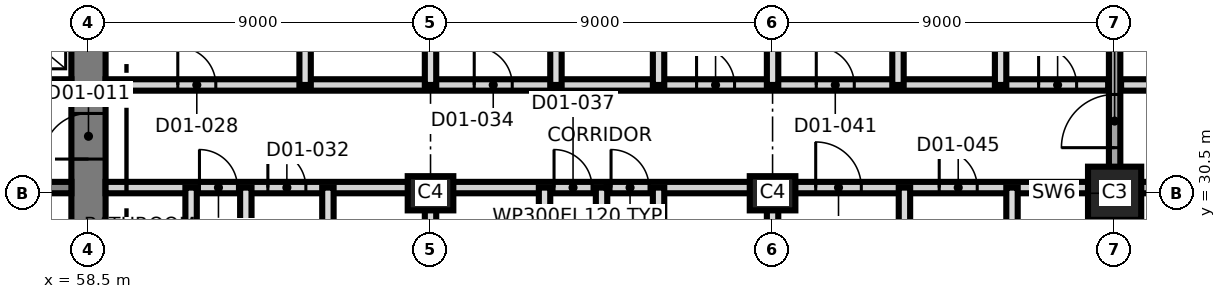
"""IFC4 building model, lengths in metres.
Left out: names, types, materials, properties, quantities, classifications, styles, units other than length and angle.
Written with IfcOpenShell. Run it as: python <this file> out.ifc"""

import sys

from ifc_helpers import new_model, si_unit, direction, frame, frame_2d, origin, origin_2d, place, context, subcontext, project, spatial, rectangle, extrude, element, fill, save


model = new_model("IFC4")
c1 = context("Model", 3, precision=1e-05, world=origin(), true_north=direction((0.0, 1.0)))
c2 = subcontext(c1, "Body", "Model", "MODEL_VIEW")
j1 = project(units=[si_unit("LENGTHUNIT", "METRE"), si_unit("PLANEANGLEUNIT", "RADIAN")], contexts=[c1])
p1 = place(None, origin())
s1 = spatial("IfcSite", under=j1, at=p1, CompositionType="ELEMENT")
p2 = place(p1, origin())
s2 = spatial("IfcBuilding", under=s1, at=p2, CompositionType="ELEMENT")
p3 = place(p2, frame((0.0, 0.0, 33.5)))
s3 = spatial("IfcBuildingStorey", under=s2, at=p3, CompositionType="ELEMENT", Elevation=33.5)
p4 = place(p3, frame((58.5, 21.05, 0.0), z_axis=(0.0, 0.0, 1.0), x_axis=(0.0, 1.0, 0.0)))
e1 = element("IfcWall", 1, at=p4, inside=s3, PredefinedType="SHEAR", context=c2, shape_type="SweptSolid", body=[
    extrude(rectangle(XDim=18.9, YDim=0.9, at=frame_2d((9.45, 0.0))), origin(), (0.0, 0.0, 1.0), 3.7),
])
p5 = place(p4, frame((10.35, 0.0, 0.0)))
e2 = element("IfcOpeningElement", 2, at=p5, cuts=e1, PredefinedType="OPENING", context=c2, shape_type="SweptSolid", body=[
    extrude(rectangle(XDim=1.2, YDim=2.1, at=frame_2d((0.6, 1.05))), frame((0.0, 0.46, 0.0), z_axis=(0.0, -1.0, 0.0), x_axis=(1.0, 0.0, 0.0)), (0.0, 0.0, 1.0), 0.92),
])
p6 = place(p3, frame((31.95, 30.65, 0.0), z_axis=(0.0, 0.0, 1.0), x_axis=(1.0, 0.0, 0.0)))
e3 = element("IfcWall", 3, at=p6, inside=s3, PredefinedType="SHEAR", context=c2, shape_type="SweptSolid", body=[
    extrude(rectangle(XDim=26.1, YDim=0.3, at=frame_2d((13.05, 0.0))), origin(), (0.0, 0.0, 1.0), 3.7),
])
p7 = place(p6, frame((24.55, 0.0, 0.0)))
e4 = element("IfcOpeningElement", 4, at=p7, cuts=e3, PredefinedType="OPENING", context=c2, shape_type="SweptSolid", body=[
    extrude(rectangle(XDim=1.0, YDim=2.1, at=frame_2d((0.5, 1.05))), frame((0.0, 0.16, 0.0), z_axis=(0.0, -1.0, 0.0), x_axis=(1.0, 0.0, 0.0)), (0.0, 0.0, 1.0), 0.32),
])
p8 = place(p6, frame((11.35, 0.0, 0.0)))
e5 = element("IfcOpeningElement", 5, at=p8, cuts=e3, PredefinedType="OPENING", context=c2, shape_type="SweptSolid", body=[
    extrude(rectangle(XDim=1.0, YDim=2.1, at=frame_2d((0.5, 1.05))), frame((0.0, 0.16, 0.0), z_axis=(0.0, -1.0, 0.0), x_axis=(1.0, 0.0, 0.0)), (0.0, 0.0, 1.0), 0.32),
])
p9 = place(p3, frame((31.95, 33.35, 0.0), z_axis=(0.0, 0.0, 1.0), x_axis=(1.0, 0.0, 0.0)))
e6 = element("IfcWall", 6, at=p9, inside=s3, PredefinedType="SHEAR", context=c2, shape_type="SweptSolid", body=[
    extrude(rectangle(XDim=26.1, YDim=0.3, at=frame_2d((13.05, 0.0))), origin(), (0.0, 0.0, 1.0), 3.7),
])
p10 = place(p9, frame((13.7, 0.0, 0.0)))
e7 = element("IfcOpeningElement", 7, at=p10, cuts=e6, PredefinedType="OPENING", context=c2, shape_type="SweptSolid", body=[
    extrude(rectangle(XDim=1.4, YDim=2.1, at=frame_2d((0.7, 1.05))), frame((0.0, 0.16, 0.0), z_axis=(0.0, -1.0, 0.0), x_axis=(1.0, 0.0, 0.0)), (0.0, 0.0, 1.0), 0.32),
])
p11 = place(p9, frame((5.175, 0.0, 0.0)))
e8 = element("IfcOpeningElement", 8, at=p11, cuts=e6, PredefinedType="OPENING", context=c2, shape_type="SweptSolid", body=[
    extrude(rectangle(XDim=1.2, YDim=2.1, at=frame_2d((0.6, 1.05))), frame((0.0, 0.16, 0.0), z_axis=(0.0, -1.0, 0.0), x_axis=(1.0, 0.0, 0.0)), (0.0, 0.0, 1.0), 0.32),
])
p12 = place(p9, frame((19.725, 0.0, 0.0)))
e9 = element("IfcOpeningElement", 9, at=p12, cuts=e6, PredefinedType="OPENING", context=c2, shape_type="SweptSolid", body=[
    extrude(rectangle(XDim=1.2, YDim=2.1, at=frame_2d((0.6, 1.05))), frame((0.0, 0.16, 0.0), z_axis=(0.0, -1.0, 0.0), x_axis=(1.0, 0.0, 0.0)), (0.0, 0.0, 1.0), 0.32),
])
for number, where, z_axis, x_axis in (
    (10, (67.5, 30.5, 0.0), (0.0, 0.0, 1.0), (1.0, 0.0, 0.0)),
    (11, (76.5, 30.5, 0.0), (0.0, 0.0, 1.0), (1.0, 0.0, 0.0)),
):
    element("IfcColumn", number, at=place(p3, frame(where, z_axis=z_axis, x_axis=x_axis)), inside=s3, PredefinedType="COLUMN", context=c2, shape_type="SweptSolid", body=[
        extrude(rectangle(XDim=1.2, YDim=0.9, at=origin_2d()), origin(), (0.0, 0.0, 1.0), 3.7),
    ])
p13 = place(p3, frame((85.5, 30.5, 0.0), z_axis=(0.0, 0.0, 1.0), x_axis=(1.0, 0.0, 0.0)))
e12 = element("IfcColumn", 12, at=p13, inside=s3, PredefinedType="COLUMN", context=c2, shape_type="SweptSolid", body=[
    extrude(rectangle(XDim=1.4, YDim=1.4, at=origin_2d()), origin(), (0.0, 0.0, 1.0), 3.7),
])
p14 = place(p3, frame((85.5, 21.425, 0.0), z_axis=(0.0, 0.0, 1.0), x_axis=(0.0, 1.0, 0.0)))
e13 = element("IfcWall", 13, at=p14, inside=s3, PredefinedType="SHEAR", context=c2, shape_type="SweptSolid", body=[
    extrude(rectangle(XDim=18.15, YDim=0.3, at=frame_2d((9.075, 0.0))), origin(), (0.0, 0.0, 1.0), 3.7),
])
p15 = place(p14, frame((10.275, 0.0, 0.0)))
e14 = element("IfcOpeningElement", 14, at=p15, cuts=e13, PredefinedType="OPENING", context=c2, shape_type="SweptSolid", body=[
    extrude(rectangle(XDim=1.4, YDim=2.1, at=frame_2d((0.7, 1.05))), frame((0.0, 0.16, 0.0), z_axis=(0.0, -1.0, 0.0), x_axis=(1.0, 0.0, 0.0)), (0.0, 0.0, 1.0), 0.32),
])
p16 = place(p3, frame((58.95, 30.65, 0.0), z_axis=(0.0, 0.0, 1.0), x_axis=(1.0, 0.0, 0.0)))
e15 = element("IfcWall", 15, at=p16, inside=s3, PredefinedType="PARTITIONING", context=c2, shape_type="SweptSolid", body=[
    extrude(rectangle(XDim=26.38, YDim=0.3, at=frame_2d((13.19, 0.0))), origin(), (0.0, 0.0, 1.0), 3.4),
])
p17 = place(p16, frame((2.47, 0.0, 0.0)))
e16 = element("IfcOpeningElement", 16, at=p17, cuts=e15, PredefinedType="OPENING", context=c2, shape_type="SweptSolid", body=[
    extrude(rectangle(XDim=1.0, YDim=2.1, at=frame_2d((0.5, 1.05))), frame((0.0, 0.16, 0.0), z_axis=(0.0, -1.0, 0.0), x_axis=(1.0, 0.0, 0.0)), (0.0, 0.0, 1.0), 0.32),
])
p18 = place(p16, frame((4.27, 0.0, 0.0)))
e17 = element("IfcOpeningElement", 17, at=p18, cuts=e15, PredefinedType="OPENING", context=c2, shape_type="SweptSolid", body=[
    extrude(rectangle(XDim=1.0, YDim=2.1, at=frame_2d((0.5, 1.05))), frame((0.0, 0.16, 0.0), z_axis=(0.0, -1.0, 0.0), x_axis=(1.0, 0.0, 0.0)), (0.0, 0.0, 1.0), 0.32),
])
p19 = place(p16, frame((11.8, 0.0, 0.0)))
e18 = element("IfcOpeningElement", 18, at=p19, cuts=e15, PredefinedType="OPENING", context=c2, shape_type="SweptSolid", body=[
    extrude(rectangle(XDim=1.0, YDim=2.4, at=frame_2d((0.5, 1.2))), frame((0.0, 0.16, 0.0), z_axis=(0.0, -1.0, 0.0), x_axis=(1.0, 0.0, 0.0)), (0.0, 0.0, 1.0), 0.32),
])
p20 = place(p16, frame((13.3, 0.0, 0.0)))
e19 = element("IfcOpeningElement", 19, at=p20, cuts=e15, PredefinedType="OPENING", context=c2, shape_type="SweptSolid", body=[
    extrude(rectangle(XDim=1.0, YDim=2.4, at=frame_2d((0.5, 1.2))), frame((0.0, 0.16, 0.0), z_axis=(0.0, -1.0, 0.0), x_axis=(1.0, 0.0, 0.0)), (0.0, 0.0, 1.0), 0.32),
])
p21 = place(p16, frame((18.685, 0.0, 0.0)))
e20 = element("IfcOpeningElement", 20, at=p21, cuts=e15, PredefinedType="OPENING", context=c2, shape_type="SweptSolid", body=[
    extrude(rectangle(XDim=1.2, YDim=2.1, at=frame_2d((0.6, 1.05))), frame((0.0, 0.16, 0.0), z_axis=(0.0, -1.0, 0.0), x_axis=(1.0, 0.0, 0.0)), (0.0, 0.0, 1.0), 0.32),
])
p22 = place(p16, frame((21.935, 0.0, 0.0)))
e21 = element("IfcOpeningElement", 21, at=p22, cuts=e15, PredefinedType="OPENING", context=c2, shape_type="SweptSolid", body=[
    extrude(rectangle(XDim=1.0, YDim=2.1, at=frame_2d((0.5, 1.05))), frame((0.0, 0.16, 0.0), z_axis=(0.0, -1.0, 0.0), x_axis=(1.0, 0.0, 0.0)), (0.0, 0.0, 1.0), 0.32),
])
p23 = place(p3, frame((85.67, 30.65, 0.0), z_axis=(0.0, 0.0, 1.0), x_axis=(1.0, 0.0, 0.0)))
e22 = element("IfcWall", 22, at=p23, inside=s3, PredefinedType="SHEAR", context=c2, shape_type="SweptSolid", body=[
    extrude(rectangle(XDim=8.905, YDim=0.3, at=frame_2d((4.453, 0.0))), origin(), (0.0, 0.0, 1.0), 3.4),
])
p24 = place(p23, frame((2.08, 0.0, 0.0)))
e23 = element("IfcOpeningElement", 23, at=p24, cuts=e22, PredefinedType="OPENING", context=c2, shape_type="SweptSolid", body=[
    extrude(rectangle(XDim=1.2, YDim=2.1, at=frame_2d((0.6, 1.05))), frame((0.0, 0.16, 0.0), z_axis=(0.0, -1.0, 0.0), x_axis=(1.0, 0.0, 0.0)), (0.0, 0.0, 1.0), 0.32),
])
p25 = place(p23, frame((5.63, 0.0, 0.0)))
e24 = element("IfcOpeningElement", 24, at=p25, cuts=e22, PredefinedType="OPENING", context=c2, shape_type="SweptSolid", body=[
    extrude(rectangle(XDim=1.0, YDim=2.1, at=frame_2d((0.5, 1.05))), frame((0.0, 0.16, 0.0), z_axis=(0.0, -1.0, 0.0), x_axis=(1.0, 0.0, 0.0)), (0.0, 0.0, 1.0), 0.32),
])
p26 = place(p3, frame((58.95, 33.35, 0.0), z_axis=(0.0, 0.0, 1.0), x_axis=(1.0, 0.0, 0.0)))
e25 = element("IfcWall", 25, at=p26, inside=s3, PredefinedType="PARTITIONING", context=c2, shape_type="SweptSolid", body=[
    extrude(rectangle(XDim=26.38, YDim=0.3, at=frame_2d((13.19, 0.0))), origin(), (0.0, 0.0, 1.0), 3.4),
])
p27 = place(p26, frame((1.9, 0.0, 0.0)))
e26 = element("IfcOpeningElement", 26, at=p27, cuts=e25, PredefinedType="OPENING", context=c2, shape_type="SweptSolid", body=[
    extrude(rectangle(XDim=1.0, YDim=2.4, at=frame_2d((0.5, 1.2))), frame((0.0, 0.16, 0.0), z_axis=(0.0, -1.0, 0.0), x_axis=(1.0, 0.0, 0.0)), (0.0, 0.0, 1.0), 0.32),
])
p28 = place(p26, frame((9.7, 0.0, 0.0)))
e27 = element("IfcOpeningElement", 27, at=p28, cuts=e25, PredefinedType="OPENING", context=c2, shape_type="SweptSolid", body=[
    extrude(rectangle(XDim=1.0, YDim=2.1, at=frame_2d((0.5, 1.05))), frame((0.0, 0.16, 0.0), z_axis=(0.0, -1.0, 0.0), x_axis=(1.0, 0.0, 0.0)), (0.0, 0.0, 1.0), 0.32),
])
p29 = place(p26, frame((15.55, 0.0, 0.0)))
e28 = element("IfcOpeningElement", 28, at=p29, cuts=e25, PredefinedType="OPENING", context=c2, shape_type="SweptSolid", body=[
    extrude(rectangle(XDim=1.0, YDim=2.1, at=frame_2d((0.5, 1.05))), frame((0.0, 0.16, 0.0), z_axis=(0.0, -1.0, 0.0), x_axis=(1.0, 0.0, 0.0)), (0.0, 0.0, 1.0), 0.32),
])
p30 = place(p26, frame((18.7, 0.0, 0.0)))
e29 = element("IfcOpeningElement", 29, at=p30, cuts=e25, PredefinedType="OPENING", context=c2, shape_type="SweptSolid", body=[
    extrude(rectangle(XDim=1.0, YDim=2.1, at=frame_2d((0.5, 1.05))), frame((0.0, 0.16, 0.0), z_axis=(0.0, -1.0, 0.0), x_axis=(1.0, 0.0, 0.0)), (0.0, 0.0, 1.0), 0.32),
])
p31 = place(p26, frame((24.55, 0.0, 0.0)))
e30 = element("IfcOpeningElement", 30, at=p31, cuts=e25, PredefinedType="OPENING", context=c2, shape_type="SweptSolid", body=[
    extrude(rectangle(XDim=1.0, YDim=2.1, at=frame_2d((0.5, 1.05))), frame((0.0, 0.16, 0.0), z_axis=(0.0, -1.0, 0.0), x_axis=(1.0, 0.0, 0.0)), (0.0, 0.0, 1.0), 0.32),
])
p32 = place(p3, frame((85.67, 33.35, 0.0), z_axis=(0.0, 0.0, 1.0), x_axis=(1.0, 0.0, 0.0)))
e31 = element("IfcWall", 31, at=p32, inside=s3, PredefinedType="PARTITIONING", context=c2, shape_type="SweptSolid", body=[
    extrude(rectangle(XDim=8.79, YDim=0.3, at=frame_2d((4.395, 0.0))), origin(), (0.0, 0.0, 1.0), 3.4),
])
p33 = place(p32, frame((1.83, 0.0, 0.0)))
e32 = element("IfcOpeningElement", 32, at=p33, cuts=e31, PredefinedType="OPENING", context=c2, shape_type="SweptSolid", body=[
    extrude(rectangle(XDim=1.0, YDim=2.1, at=frame_2d((0.5, 1.05))), frame((0.0, 0.16, 0.0), z_axis=(0.0, -1.0, 0.0), x_axis=(1.0, 0.0, 0.0)), (0.0, 0.0, 1.0), 0.32),
])
p34 = place(p32, frame((5.63, 0.0, 0.0)))
e33 = element("IfcOpeningElement", 33, at=p34, cuts=e31, PredefinedType="OPENING", context=c2, shape_type="SweptSolid", body=[
    extrude(rectangle(XDim=1.0, YDim=2.1, at=frame_2d((0.5, 1.05))), frame((0.0, 0.16, 0.0), z_axis=(0.0, -1.0, 0.0), x_axis=(1.0, 0.0, 0.0)), (0.0, 0.0, 1.0), 0.32),
])
p35 = place(p3, frame((61.2, 27.45, 0.0), z_axis=(0.0, 0.0, 1.0), x_axis=(0.0, 1.0, 0.0)))
e34 = element("IfcWall", 34, at=p35, inside=s3, PredefinedType="PARTITIONING", context=c2, shape_type="SweptSolid", body=[
    extrude(rectangle(XDim=3.2, YDim=0.3, at=frame_2d((1.6, 0.0))), origin(), (0.0, 0.0, 1.0), 3.4),
])
p36 = place(p3, frame((62.64, 21.425, 0.0), z_axis=(0.0, 0.0, 1.0), x_axis=(0.0, 1.0, 0.0)))
e35 = element("IfcWall", 35, at=p36, inside=s3, PredefinedType="PARTITIONING", context=c2, shape_type="SweptSolid", body=[
    extrude(rectangle(XDim=9.225, YDim=0.3, at=frame_2d((4.612, 0.0))), origin(), (0.0, 0.0, 1.0), 3.4),
])
p37 = place(p3, frame((64.2, 33.35, 0.0), z_axis=(0.0, 0.0, 1.0), x_axis=(0.0, 1.0, 0.0)))
e36 = element("IfcWall", 36, at=p37, inside=s3, PredefinedType="PARTITIONING", context=c2, shape_type="SweptSolid", body=[
    extrude(rectangle(XDim=3.5, YDim=0.3, at=frame_2d((1.75, 0.0))), origin(), (0.0, 0.0, 1.0), 3.4),
])
p38 = place(p3, frame((64.8, 27.45, 0.0), z_axis=(0.0, 0.0, 1.0), x_axis=(0.0, 1.0, 0.0)))
e37 = element("IfcWall", 37, at=p38, inside=s3, PredefinedType="PARTITIONING", context=c2, shape_type="SweptSolid", body=[
    extrude(rectangle(XDim=3.2, YDim=0.3, at=frame_2d((1.6, 0.0))), origin(), (0.0, 0.0, 1.0), 3.4),
])
p39 = place(p3, frame((67.5, 21.425, 0.0), z_axis=(0.0, 0.0, 1.0), x_axis=(0.0, 1.0, 0.0)))
e38 = element("IfcWall", 38, at=p39, inside=s3, PredefinedType="PARTITIONING", context=c2, shape_type="SweptSolid", body=[
    extrude(rectangle(XDim=9.225, YDim=0.3, at=frame_2d((4.612, 0.0))), origin(), (0.0, 0.0, 1.0), 3.4),
])
p40 = place(p3, frame((67.5, 33.35, 0.0), z_axis=(0.0, 0.0, 1.0), x_axis=(0.0, 1.0, 0.0)))
e39 = element("IfcWall", 39, at=p40, inside=s3, PredefinedType="PARTITIONING", context=c2, shape_type="SweptSolid", body=[
    extrude(rectangle(XDim=6.225, YDim=0.3, at=frame_2d((3.112, 0.0))), origin(), (0.0, 0.0, 1.0), 3.4),
])
p41 = place(p3, frame((70.5, 27.35, 0.0), z_axis=(0.0, 0.0, 1.0), x_axis=(0.0, 1.0, 0.0)))
e40 = element("IfcWall", 40, at=p41, inside=s3, PredefinedType="PARTITIONING", context=c2, shape_type="SweptSolid", body=[
    extrude(rectangle(XDim=3.3, YDim=0.3, at=frame_2d((1.65, 0.0))), origin(), (0.0, 0.0, 1.0), 3.4),
])
p42 = place(p3, frame((70.8, 33.35, 0.0), z_axis=(0.0, 0.0, 1.0), x_axis=(0.0, 1.0, 0.0)))
e41 = element("IfcWall", 41, at=p42, inside=s3, PredefinedType="PARTITIONING", context=c2, shape_type="SweptSolid", body=[
    extrude(rectangle(XDim=3.2, YDim=0.3, at=frame_2d((1.6, 0.0))), origin(), (0.0, 0.0, 1.0), 3.4),
])
p43 = place(p3, frame((72.0, 21.425, 0.0), z_axis=(0.0, 0.0, 1.0), x_axis=(0.0, 1.0, 0.0)))
e42 = element("IfcWall", 42, at=p43, inside=s3, PredefinedType="PARTITIONING", context=c2, shape_type="SweptSolid", body=[
    extrude(rectangle(XDim=9.225, YDim=0.3, at=frame_2d((4.612, 0.0))), origin(), (0.0, 0.0, 1.0), 3.4),
])
p44 = place(p3, frame((73.5, 27.35, 0.0), z_axis=(0.0, 0.0, 1.0), x_axis=(0.0, 1.0, 0.0)))
e43 = element("IfcWall", 43, at=p44, inside=s3, PredefinedType="PARTITIONING", context=c2, shape_type="SweptSolid", body=[
    extrude(rectangle(XDim=3.3, YDim=0.3, at=frame_2d((1.65, 0.0))), origin(), (0.0, 0.0, 1.0), 3.4),
])
p45 = place(p3, frame((73.5, 33.35, 0.0), z_axis=(0.0, 0.0, 1.0), x_axis=(0.0, 1.0, 0.0)))
e44 = element("IfcWall", 44, at=p45, inside=s3, PredefinedType="PARTITIONING", context=c2, shape_type="SweptSolid", body=[
    extrude(rectangle(XDim=6.405, YDim=0.3, at=frame_2d((3.202, 0.0))), origin(), (0.0, 0.0, 1.0), 3.4),
])
p46 = place(p3, frame((76.5, 21.425, 0.0), z_axis=(0.0, 0.0, 1.0), x_axis=(0.0, 1.0, 0.0)))
e45 = element("IfcWall", 45, at=p46, inside=s3, PredefinedType="PARTITIONING", context=c2, shape_type="SweptSolid", body=[
    extrude(rectangle(XDim=9.225, YDim=0.3, at=frame_2d((4.612, 0.0))), origin(), (0.0, 0.0, 1.0), 3.4),
])
p47 = place(p3, frame((76.5, 33.35, 0.0), z_axis=(0.0, 0.0, 1.0), x_axis=(0.0, 1.0, 0.0)))
e46 = element("IfcWall", 46, at=p47, inside=s3, PredefinedType="PARTITIONING", context=c2, shape_type="SweptSolid", body=[
    extrude(rectangle(XDim=6.225, YDim=0.3, at=frame_2d((3.112, 0.0))), origin(), (0.0, 0.0, 1.0), 3.4),
])
p48 = place(p3, frame((79.8, 33.35, 0.0), z_axis=(0.0, 0.0, 1.0), x_axis=(0.0, 1.0, 0.0)))
e47 = element("IfcWall", 47, at=p48, inside=s3, PredefinedType="PARTITIONING", context=c2, shape_type="SweptSolid", body=[
    extrude(rectangle(XDim=3.2, YDim=0.3, at=frame_2d((1.6, 0.0))), origin(), (0.0, 0.0, 1.0), 3.4),
])
p49 = place(p3, frame((79.97, 21.425, 0.0), z_axis=(0.0, 0.0, 1.0), x_axis=(0.0, 1.0, 0.0)))
e48 = element("IfcWall", 48, at=p49, inside=s3, PredefinedType="PARTITIONING", context=c2, shape_type="SweptSolid", body=[
    extrude(rectangle(XDim=9.225, YDim=0.3, at=frame_2d((4.612, 0.0))), origin(), (0.0, 0.0, 1.0), 3.4),
])
p50 = place(p3, frame((82.5, 33.35, 0.0), z_axis=(0.0, 0.0, 1.0), x_axis=(0.0, 1.0, 0.0)))
e49 = element("IfcWall", 49, at=p50, inside=s3, PredefinedType="PARTITIONING", context=c2, shape_type="SweptSolid", body=[
    extrude(rectangle(XDim=6.405, YDim=0.3, at=frame_2d((3.202, 0.0))), origin(), (0.0, 0.0, 1.0), 3.4),
])
p51 = place(p3, frame((82.8, 27.45, 0.0), z_axis=(0.0, 0.0, 1.0), x_axis=(0.0, 1.0, 0.0)))
e50 = element("IfcWall", 50, at=p51, inside=s3, PredefinedType="PARTITIONING", context=c2, shape_type="SweptSolid", body=[
    extrude(rectangle(XDim=3.2, YDim=0.3, at=frame_2d((1.6, 0.0))), origin(), (0.0, 0.0, 1.0), 3.4),
])
p52 = place(p5, origin())
e51 = element("IfcDoor", 51, at=p52, inside=s3, OperationType="SINGLE_SWING_LEFT", PredefinedType="DOOR", context=c2, shape_type="SweptSolid", body=[
    extrude(rectangle(XDim=1.2, YDim=2.1, at=frame_2d((0.6, 1.05))), frame((0.0, 0.025, 0.0), z_axis=(0.0, -1.0, 0.0), x_axis=(1.0, 0.0, 0.0)), (0.0, 0.0, 1.0), 0.05),
])
fill(e2, e51)
p53 = place(p27, origin())
e52 = element("IfcDoor", 52, at=p53, inside=s3, OperationType="SINGLE_SWING_LEFT", PredefinedType="DOOR", context=c2, shape_type="SweptSolid", body=[
    extrude(rectangle(XDim=1.0, YDim=2.4, at=frame_2d((0.5, 1.2))), frame((0.0, 0.025, 0.0), z_axis=(0.0, -1.0, 0.0), x_axis=(1.0, 0.0, 0.0)), (0.0, 0.0, 1.0), 0.05),
])
fill(e26, e52)
p54 = place(p17, origin())
e53 = element("IfcDoor", 53, at=p54, inside=s3, OperationType="SINGLE_SWING_RIGHT", PredefinedType="DOOR", context=c2, shape_type="SweptSolid", body=[
    extrude(rectangle(XDim=1.0, YDim=2.1, at=frame_2d((0.5, 1.05))), frame((0.0, 0.025, 0.0), z_axis=(0.0, -1.0, 0.0), x_axis=(1.0, 0.0, 0.0)), (0.0, 0.0, 1.0), 0.05),
])
fill(e16, e53)
p55 = place(p18, origin())
e54 = element("IfcDoor", 54, at=p55, inside=s3, OperationType="SINGLE_SWING_LEFT", PredefinedType="DOOR", context=c2, shape_type="SweptSolid", body=[
    extrude(rectangle(XDim=1.0, YDim=2.1, at=frame_2d((0.5, 1.05))), frame((0.0, 0.025, 0.0), z_axis=(0.0, -1.0, 0.0), x_axis=(1.0, 0.0, 0.0)), (0.0, 0.0, 1.0), 0.05),
])
fill(e17, e54)
p56 = place(p28, origin())
e55 = element("IfcDoor", 55, at=p56, inside=s3, OperationType="SINGLE_SWING_LEFT", PredefinedType="DOOR", context=c2, shape_type="SweptSolid", body=[
    extrude(rectangle(XDim=1.0, YDim=2.1, at=frame_2d((0.5, 1.05))), frame((0.0, 0.025, 0.0), z_axis=(0.0, -1.0, 0.0), x_axis=(1.0, 0.0, 0.0)), (0.0, 0.0, 1.0), 0.05),
])
fill(e27, e55)
p57 = place(p29, origin())
e56 = element("IfcDoor", 56, at=p57, inside=s3, OperationType="SINGLE_SWING_RIGHT", PredefinedType="DOOR", context=c2, shape_type="SweptSolid", body=[
    extrude(rectangle(XDim=1.0, YDim=2.1, at=frame_2d((0.5, 1.05))), frame((0.0, 0.025, 0.0), z_axis=(0.0, -1.0, 0.0), x_axis=(1.0, 0.0, 0.0)), (0.0, 0.0, 1.0), 0.05),
])
fill(e28, e56)
p58 = place(p19, origin())
e57 = element("IfcDoor", 57, at=p58, inside=s3, OperationType="SINGLE_SWING_LEFT", PredefinedType="DOOR", context=c2, shape_type="SweptSolid", body=[
    extrude(rectangle(XDim=1.0, YDim=2.4, at=frame_2d((0.5, 1.2))), frame((0.0, 0.025, 0.0), z_axis=(0.0, -1.0, 0.0), x_axis=(1.0, 0.0, 0.0)), (0.0, 0.0, 1.0), 0.05),
])
fill(e18, e57)
p59 = place(p20, origin())
e58 = element("IfcDoor", 58, at=p59, inside=s3, OperationType="SINGLE_SWING_RIGHT", PredefinedType="DOOR", context=c2, shape_type="SweptSolid", body=[
    extrude(rectangle(XDim=1.0, YDim=2.4, at=frame_2d((0.5, 1.2))), frame((0.0, 0.025, 0.0), z_axis=(0.0, -1.0, 0.0), x_axis=(1.0, 0.0, 0.0)), (0.0, 0.0, 1.0), 0.05),
])
fill(e19, e58)
p60 = place(p30, origin())
e59 = element("IfcDoor", 59, at=p60, inside=s3, OperationType="SINGLE_SWING_LEFT", PredefinedType="DOOR", context=c2, shape_type="SweptSolid", body=[
    extrude(rectangle(XDim=1.0, YDim=2.1, at=frame_2d((0.5, 1.05))), frame((0.0, 0.025, 0.0), z_axis=(0.0, -1.0, 0.0), x_axis=(1.0, 0.0, 0.0)), (0.0, 0.0, 1.0), 0.05),
])
fill(e29, e59)
p61 = place(p31, origin())
e60 = element("IfcDoor", 60, at=p61, inside=s3, OperationType="SINGLE_SWING_LEFT", PredefinedType="DOOR", context=c2, shape_type="SweptSolid", body=[
    extrude(rectangle(XDim=1.0, YDim=2.1, at=frame_2d((0.5, 1.05))), frame((0.0, 0.025, 0.0), z_axis=(0.0, -1.0, 0.0), x_axis=(1.0, 0.0, 0.0)), (0.0, 0.0, 1.0), 0.05),
])
fill(e30, e60)
p62 = place(p21, origin())
e61 = element("IfcDoor", 61, at=p62, inside=s3, OperationType="SINGLE_SWING_LEFT", PredefinedType="DOOR", context=c2, shape_type="SweptSolid", body=[
    extrude(rectangle(XDim=1.2, YDim=2.1, at=frame_2d((0.6, 1.05))), frame((0.0, 0.025, 0.0), z_axis=(0.0, -1.0, 0.0), x_axis=(1.0, 0.0, 0.0)), (0.0, 0.0, 1.0), 0.05),
])
fill(e20, e61)
p63 = place(p22, origin())
e62 = element("IfcDoor", 62, at=p63, inside=s3, OperationType="SINGLE_SWING_RIGHT", PredefinedType="DOOR", context=c2, shape_type="SweptSolid", body=[
    extrude(rectangle(XDim=1.0, YDim=2.1, at=frame_2d((0.5, 1.05))), frame((0.0, 0.025, 0.0), z_axis=(0.0, -1.0, 0.0), x_axis=(1.0, 0.0, 0.0)), (0.0, 0.0, 1.0), 0.05),
])
fill(e21, e62)
p64 = place(p15, origin())
e63 = element("IfcDoor", 63, at=p64, inside=s3, OperationType="SINGLE_SWING_RIGHT", PredefinedType="DOOR", context=c2, shape_type="SweptSolid", body=[
    extrude(rectangle(XDim=1.4, YDim=2.1, at=frame_2d((0.7, 1.05))), frame((0.0, 0.025, 0.0), z_axis=(0.0, -1.0, 0.0), x_axis=(1.0, 0.0, 0.0)), (0.0, 0.0, 1.0), 0.05),
])
fill(e14, e63)
save(model, sys.argv[1])
